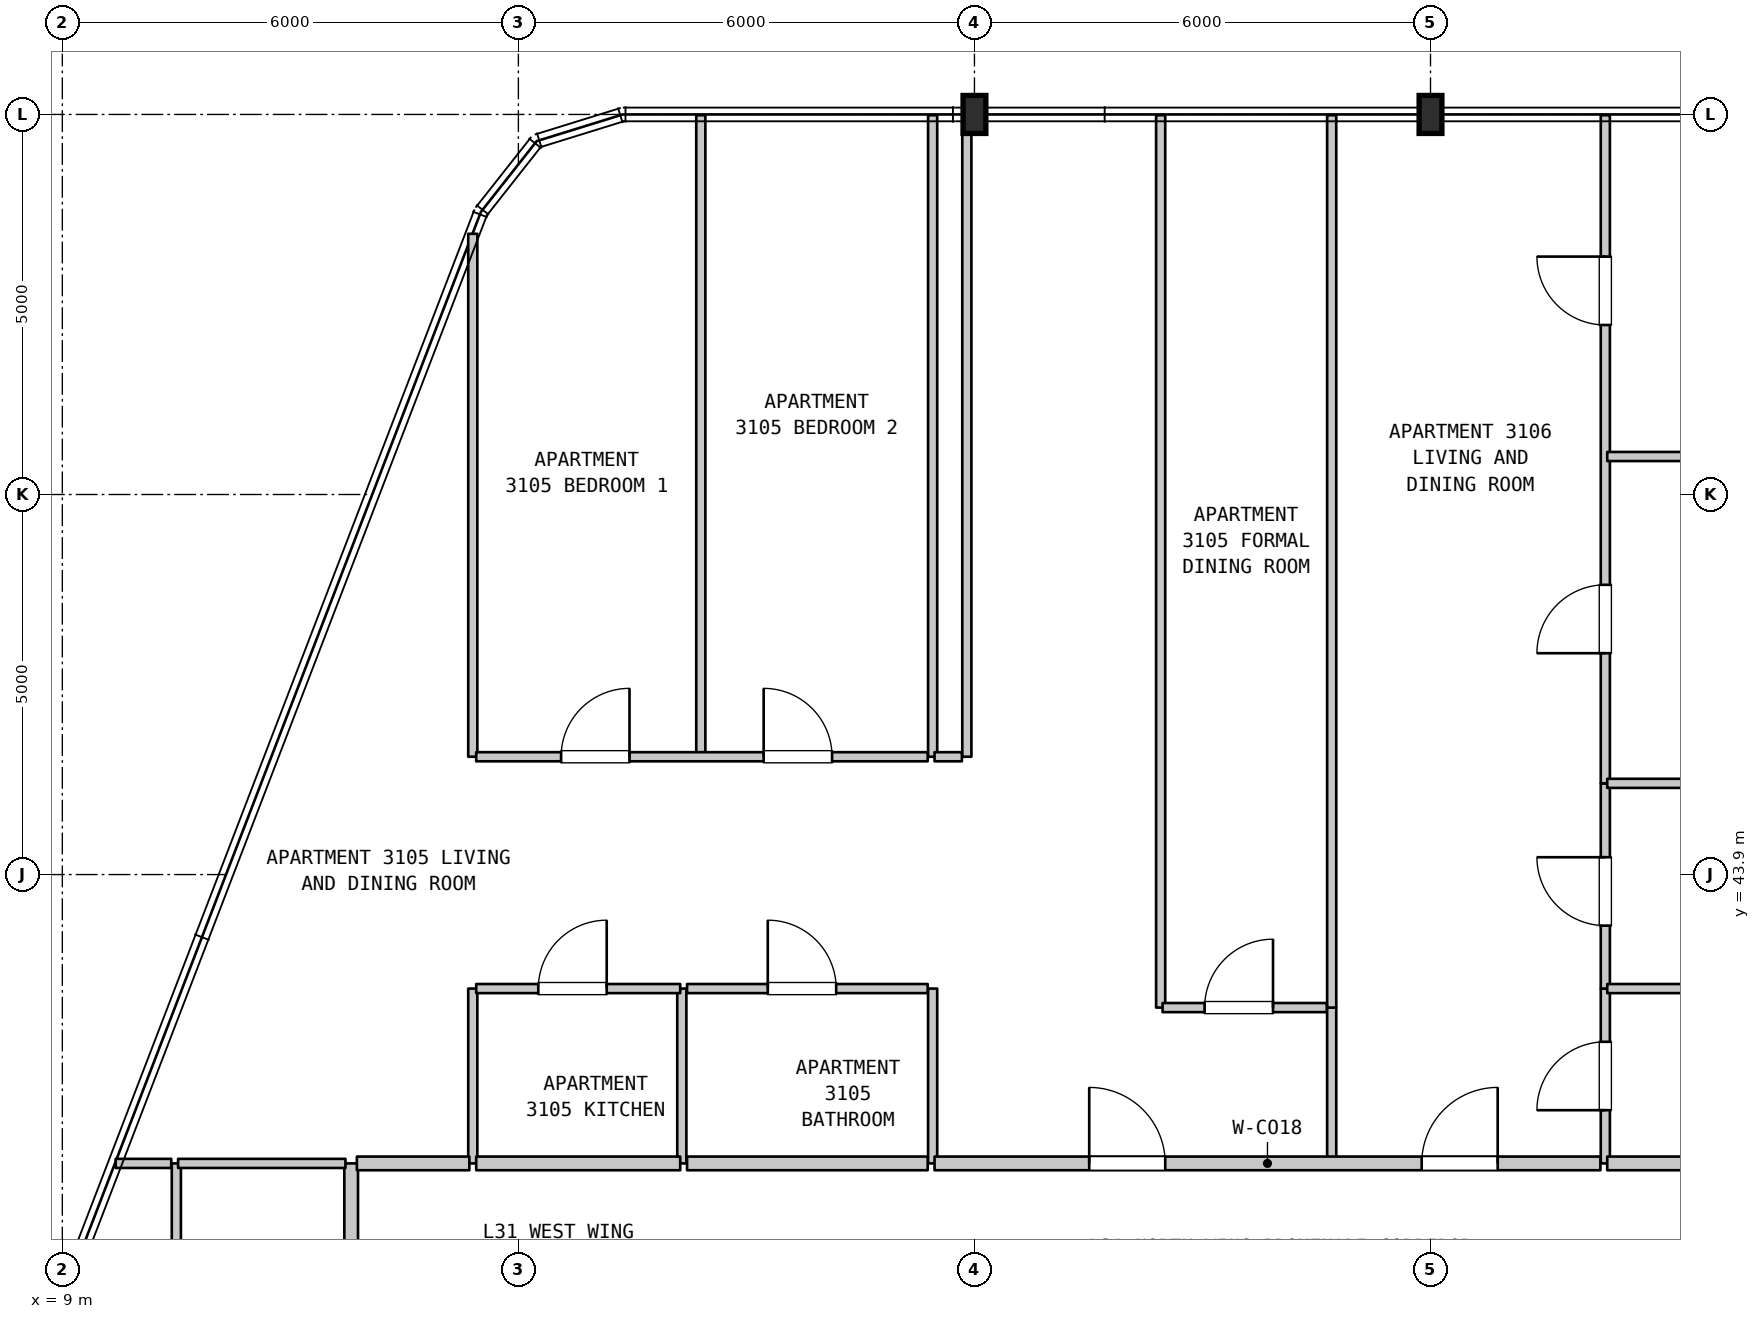
"""IFC4 building model, lengths in metres.
Left out: names, types, materials, properties, quantities, classifications, styles, units other than length and angle.
Written with IfcOpenShell. Run it as: python <this file> out.ifc"""

import sys

from ifc_helpers import new_model, si_unit, direction, frame, frame_2d, origin, origin_2d, place, context, subcontext, project, spatial, rectangle, i_section, extrude, element, fill, save


model = new_model("IFC4")
c1 = context("Model", 3, precision=1e-05, world=origin(), true_north=direction((0.0, 1.0)))
c2 = subcontext(c1, "Body", "Model", "MODEL_VIEW")
j1 = project(units=[si_unit("LENGTHUNIT", "METRE"), si_unit("PLANEANGLEUNIT", "RADIAN")], contexts=[c1])
p1 = place(None, origin())
s1 = spatial("IfcSite", under=j1, at=p1, CompositionType="ELEMENT")
p2 = place(p1, origin())
s2 = spatial("IfcBuilding", under=s1, at=p2, CompositionType="ELEMENT")
p3 = place(p2, frame((0.0, 0.0, 129.8)))
s3 = spatial("IfcBuildingStorey", under=s2, at=p3, CompositionType="ELEMENT", Elevation=129.8)
for number, where, z_axis, x_axis in (
    (1, (21.0, 53.9, 0.0), (0.0, 0.0, 1.0), (1.0, 0.0, 0.0)),
    (2, (27.0, 53.9, 0.0), (0.0, 0.0, 1.0), (1.0, 0.0, 0.0)),
):
    element("IfcColumn", number, at=place(p3, frame(where, z_axis=z_axis, x_axis=x_axis)), inside=s3, PredefinedType="COLUMN", context=c2, shape_type="SweptSolid", body=[
        extrude(i_section(OverallWidth=0.3, OverallDepth=0.5, WebThickness=0.014, FlangeThickness=0.028, FilletRadius=0.027, at=origin_2d()), origin(), (0.0, 0.0, 1.0), 3.7),
    ])
p4 = place(p3, frame((10.5, 32.36, 0.0), z_axis=(0.0, 0.0, 1.0), x_axis=(0.0, 1.0, 0.0)))
e3 = element("IfcWall", 3, at=p4, inside=s3, PredefinedType="PARTITIONING", context=c2, shape_type="SweptSolid", body=[
    extrude(rectangle(XDim=7.74, YDim=0.12, at=frame_2d((3.87, 0.0))), origin(), (0.0, 0.0, 1.0), 3.385),
])
p5 = place(p3, frame((12.8, 32.36, 0.0), z_axis=(0.0, 0.0, 1.0), x_axis=(0.0, 1.0, 0.0)))
e4 = element("IfcWall", 4, at=p5, inside=s3, PredefinedType="STANDARD", context=c2, shape_type="SweptSolid", body=[
    extrude(rectangle(XDim=7.74, YDim=0.18, at=frame_2d((3.87, 0.0))), origin(), (0.0, 0.0, 1.0), 3.385),
])
p6 = place(p3, frame((14.4, 40.1, 0.0), z_axis=(0.0, 0.0, 1.0), x_axis=(0.0, 1.0, 0.0)))
e5 = element("IfcWall", 5, at=p6, inside=s3, PredefinedType="PARTITIONING", context=c2, shape_type="SweptSolid", body=[
    extrude(rectangle(XDim=2.3, YDim=0.12, at=frame_2d((1.15, 0.0))), origin(), (0.0, 0.0, 1.0), 3.385),
])
p7 = place(p3, frame((14.4, 45.45, 0.0), z_axis=(0.0, 0.0, 1.0), x_axis=(0.0, 1.0, 0.0)))
e6 = element("IfcWall", 6, at=p7, inside=s3, PredefinedType="PARTITIONING", context=c2, shape_type="SweptSolid", body=[
    extrude(rectangle(XDim=6.88, YDim=0.12, at=frame_2d((3.44, 0.0))), origin(), (0.0, 0.0, 1.0), 3.385),
])
p8 = place(p3, frame((17.15, 40.1, 0.0), z_axis=(0.0, 0.0, 1.0), x_axis=(0.0, 1.0, 0.0)))
e7 = element("IfcWall", 7, at=p8, inside=s3, PredefinedType="PARTITIONING", context=c2, shape_type="SweptSolid", body=[
    extrude(rectangle(XDim=2.3, YDim=0.12, at=frame_2d((1.15, 0.0))), origin(), (0.0, 0.0, 1.0), 3.385),
])
p9 = place(p3, frame((17.4, 45.45, 0.0), z_axis=(0.0, 0.0, 1.0), x_axis=(0.0, 1.0, 0.0)))
e8 = element("IfcWall", 8, at=p9, inside=s3, PredefinedType="PARTITIONING", context=c2, shape_type="SweptSolid", body=[
    extrude(rectangle(XDim=8.44, YDim=0.12, at=frame_2d((4.22, 0.0))), origin(), (0.0, 0.0, 1.0), 3.385),
])
p10 = place(p3, frame((20.45, 40.1, 0.0), z_axis=(0.0, 0.0, 1.0), x_axis=(0.0, 1.0, 0.0)))
e9 = element("IfcWall", 9, at=p10, inside=s3, PredefinedType="PARTITIONING", context=c2, shape_type="SweptSolid", body=[
    extrude(rectangle(XDim=2.3, YDim=0.12, at=frame_2d((1.15, 0.0))), origin(), (0.0, 0.0, 1.0), 3.385),
])
for number, where, z_axis, x_axis in (
    (10, (20.45, 45.45, 0.0), (0.0, 0.0, 1.0), (0.0, 1.0, 0.0)),
    (11, (20.9, 45.45, 0.0), (0.0, 0.0, 1.0), (0.0, 1.0, 0.0)),
):
    element("IfcWall", number, at=place(p3, frame(where, z_axis=z_axis, x_axis=x_axis)), inside=s3, PredefinedType="PARTITIONING", context=c2, shape_type="SweptSolid", body=[
        extrude(rectangle(XDim=8.44, YDim=0.12, at=frame_2d((4.22, 0.0))), origin(), (0.0, 0.0, 1.0), 3.385),
    ])
p11 = place(p3, frame((23.45, 42.15, 0.0), z_axis=(0.0, 0.0, 1.0), x_axis=(0.0, 1.0, 0.0)))
e12 = element("IfcWall", 12, at=p11, inside=s3, PredefinedType="PARTITIONING", context=c2, shape_type="SweptSolid", body=[
    extrude(rectangle(XDim=11.74, YDim=0.12, at=frame_2d((5.87, 0.0))), origin(), (0.0, 0.0, 1.0), 3.385),
])
p12 = place(p3, frame((25.7, 40.1, 0.0), z_axis=(0.0, 0.0, 1.0), x_axis=(0.0, 1.0, 0.0)))
e13 = element("IfcWall", 13, at=p12, inside=s3, PredefinedType="PARTITIONING", context=c2, shape_type="SweptSolid", body=[
    extrude(rectangle(XDim=2.05, YDim=0.12, at=frame_2d((1.025, 0.0))), origin(), (0.0, 0.0, 1.0), 3.385),
])
p13 = place(p3, frame((25.7, 42.15, 0.0), z_axis=(0.0, 0.0, 1.0), x_axis=(0.0, 1.0, 0.0)))
e14 = element("IfcWall", 14, at=p13, inside=s3, PredefinedType="PARTITIONING", context=c2, shape_type="SweptSolid", body=[
    extrude(rectangle(XDim=11.74, YDim=0.12, at=frame_2d((5.87, 0.0))), origin(), (0.0, 0.0, 1.0), 3.385),
])
p14 = place(p3, frame((29.3, 40.1, 0.0), z_axis=(0.0, 0.0, 1.0), x_axis=(0.0, 1.0, 0.0)))
e15 = element("IfcWall", 15, at=p14, inside=s3, PredefinedType="PARTITIONING", context=c2, shape_type="SweptSolid", body=[
    extrude(rectangle(XDim=2.3, YDim=0.12, at=frame_2d((1.15, 0.0))), origin(), (0.0, 0.0, 1.0), 3.385),
])
p15 = place(p14, frame((0.7, 0.0, 0.0)))
e16 = element("IfcOpeningElement", 16, at=p15, cuts=e15, PredefinedType="OPENING", context=c2, shape_type="SweptSolid", body=[
    extrude(rectangle(XDim=0.9, YDim=2.15, at=frame_2d((0.45, 1.075))), frame((0.0, 0.07, 0.0), z_axis=(0.0, -1.0, 0.0), x_axis=(1.0, 0.0, 0.0)), (0.0, 0.0, 1.0), 0.14),
])
p16 = place(p3, frame((29.3, 42.4, 0.0), z_axis=(0.0, 0.0, 1.0), x_axis=(0.0, 1.0, 0.0)))
e17 = element("IfcWall", 17, at=p16, inside=s3, PredefinedType="PARTITIONING", context=c2, shape_type="SweptSolid", body=[
    extrude(rectangle(XDim=2.7, YDim=0.12, at=frame_2d((1.35, 0.0))), origin(), (0.0, 0.0, 1.0), 3.385),
])
p17 = place(p16, frame((0.828, 0.0, 0.0)))
e18 = element("IfcOpeningElement", 18, at=p17, cuts=e17, PredefinedType="OPENING", context=c2, shape_type="SweptSolid", body=[
    extrude(rectangle(XDim=0.9, YDim=2.1, at=frame_2d((0.45, 1.05))), frame((0.0, 0.07, 0.0), z_axis=(0.0, -1.0, 0.0), x_axis=(1.0, 0.0, 0.0)), (0.0, 0.0, 1.0), 0.14),
])
p18 = place(p3, frame((29.3, 45.1, 0.0), z_axis=(0.0, 0.0, 1.0), x_axis=(0.0, 1.0, 0.0)))
e19 = element("IfcWall", 19, at=p18, inside=s3, PredefinedType="PARTITIONING", context=c2, shape_type="SweptSolid", body=[
    extrude(rectangle(XDim=8.79, YDim=0.12, at=frame_2d((4.395, 0.0))), origin(), (0.0, 0.0, 1.0), 3.385),
])
p19 = place(p18, frame((1.712, 0.0, 0.0)))
e20 = element("IfcOpeningElement", 20, at=p19, cuts=e19, PredefinedType="OPENING", context=c2, shape_type="SweptSolid", body=[
    extrude(rectangle(XDim=0.9, YDim=2.15, at=frame_2d((0.45, 1.075))), frame((0.0, 0.07, 0.0), z_axis=(0.0, -1.0, 0.0), x_axis=(1.0, 0.0, 0.0)), (0.0, 0.0, 1.0), 0.14),
])
p20 = place(p18, frame((6.03, 0.0, 0.0)))
e21 = element("IfcOpeningElement", 21, at=p20, cuts=e19, PredefinedType="OPENING", context=c2, shape_type="SweptSolid", body=[
    extrude(rectangle(XDim=0.9, YDim=2.15, at=frame_2d((0.45, 1.075))), frame((0.0, 0.07, 0.0), z_axis=(0.0, -1.0, 0.0), x_axis=(1.0, 0.0, 0.0)), (0.0, 0.0, 1.0), 0.14),
])
p21 = place(p3, frame((9.702, 40.1, 0.0), z_axis=(0.0, 0.0, 1.0), x_axis=(1.0, 0.0, 0.0)))
e22 = element("IfcWall", 22, at=p21, inside=s3, PredefinedType="PARTITIONING", context=c2, shape_type="SweptSolid", body=[
    extrude(rectangle(XDim=0.731, YDim=0.12, at=frame_2d((0.366, 0.0))), origin(), (0.0, 0.0, 1.0), 3.385),
])
p22 = place(p3, frame((10.523, 40.1, 0.0), z_axis=(0.0, 0.0, 1.0), x_axis=(1.0, 0.0, 0.0)))
e23 = element("IfcWall", 23, at=p22, inside=s3, PredefinedType="PARTITIONING", context=c2, shape_type="SweptSolid", body=[
    extrude(rectangle(XDim=2.202, YDim=0.12, at=frame_2d((1.101, 0.0))), origin(), (0.0, 0.0, 1.0), 3.385),
])
p23 = place(p3, frame((12.875, 40.1, 0.0), z_axis=(0.0, 0.0, 1.0), x_axis=(1.0, 0.0, 0.0)))
e24 = element("IfcWall", 24, at=p23, inside=s3, PredefinedType="STANDARD", context=c2, shape_type="SweptSolid", body=[
    extrude(rectangle(XDim=1.48, YDim=0.18, at=frame_2d((0.74, 0.0))), origin(), (0.0, 0.0, 1.0), 3.385),
])
p24 = place(p3, frame((14.445, 40.1, 0.0), z_axis=(0.0, 0.0, 1.0), x_axis=(1.0, 0.0, 0.0)))
e25 = element("IfcWall", 25, at=p24, inside=s3, PredefinedType="STANDARD", context=c2, shape_type="SweptSolid", body=[
    extrude(rectangle(XDim=2.684, YDim=0.18, at=frame_2d((1.342, 0.0))), origin(), (0.0, 0.0, 1.0), 3.385),
])
p25 = place(p3, frame((17.219, 40.1, 0.0), z_axis=(0.0, 0.0, 1.0), x_axis=(1.0, 0.0, 0.0)))
e26 = element("IfcWall", 26, at=p25, inside=s3, PredefinedType="STANDARD", context=c2, shape_type="SweptSolid", body=[
    extrude(rectangle(XDim=3.166, YDim=0.18, at=frame_2d((1.583, 0.0))), origin(), (0.0, 0.0, 1.0), 3.385),
])
p26 = place(p3, frame((20.475, 40.1, 0.0), z_axis=(0.0, 0.0, 1.0), x_axis=(1.0, 0.0, 0.0)))
e27 = element("IfcWall", 27, at=p26, inside=s3, PredefinedType="STANDARD", context=c2, shape_type="SweptSolid", body=[
    extrude(rectangle(XDim=8.76, YDim=0.18, at=frame_2d((4.38, 0.0))), origin(), (0.0, 0.0, 1.0), 3.385),
])
p27 = place(p26, frame((2.035, 0.0, 0.0)))
e28 = element("IfcOpeningElement", 28, at=p27, cuts=e27, PredefinedType="OPENING", context=c2, shape_type="SweptSolid", body=[
    extrude(rectangle(XDim=1.0, YDim=2.15, at=frame_2d((0.5, 1.075))), frame((0.0, 0.1, 0.0), z_axis=(0.0, -1.0, 0.0), x_axis=(1.0, 0.0, 0.0)), (0.0, 0.0, 1.0), 0.2),
])
p28 = place(p26, frame((6.409, 0.0, 0.0)))
e29 = element("IfcOpeningElement", 29, at=p28, cuts=e27, PredefinedType="OPENING", context=c2, shape_type="SweptSolid", body=[
    extrude(rectangle(XDim=1.0, YDim=2.15, at=frame_2d((0.5, 1.075))), frame((0.0, 0.1, 0.0), z_axis=(0.0, -1.0, 0.0), x_axis=(1.0, 0.0, 0.0)), (0.0, 0.0, 1.0), 0.2),
])
p29 = place(p3, frame((29.325, 40.1, 0.0), z_axis=(0.0, 0.0, 1.0), x_axis=(1.0, 0.0, 0.0)))
e30 = element("IfcWall", 30, at=p29, inside=s3, PredefinedType="STANDARD", context=c2, shape_type="SweptSolid", body=[
    extrude(rectangle(XDim=6.02, YDim=0.18, at=frame_2d((3.01, 0.0))), origin(), (0.0, 0.0, 1.0), 3.385),
])
p30 = place(p3, frame((23.475, 42.15, 0.0), z_axis=(0.0, 0.0, 1.0), x_axis=(1.0, 0.0, 0.0)))
e31 = element("IfcWall", 31, at=p30, inside=s3, PredefinedType="PARTITIONING", context=c2, shape_type="SweptSolid", body=[
    extrude(rectangle(XDim=2.16, YDim=0.12, at=frame_2d((1.08, 0.0))), origin(), (0.0, 0.0, 1.0), 3.385),
])
p31 = place(p30, frame((0.553, 0.0, 0.0)))
e32 = element("IfcOpeningElement", 32, at=p31, cuts=e31, PredefinedType="OPENING", context=c2, shape_type="SweptSolid", body=[
    extrude(rectangle(XDim=0.9, YDim=2.15, at=frame_2d((0.45, 1.075))), frame((0.0, 0.07, 0.0), z_axis=(0.0, -1.0, 0.0), x_axis=(1.0, 0.0, 0.0)), (0.0, 0.0, 1.0), 0.14),
])
p32 = place(p3, frame((14.445, 42.4, 0.0), z_axis=(0.0, 0.0, 1.0), x_axis=(1.0, 0.0, 0.0)))
e33 = element("IfcWall", 33, at=p32, inside=s3, PredefinedType="PARTITIONING", context=c2, shape_type="SweptSolid", body=[
    extrude(rectangle(XDim=2.684, YDim=0.12, at=frame_2d((1.342, 0.0))), origin(), (0.0, 0.0, 1.0), 3.385),
])
p33 = place(p32, frame((0.817, 0.0, 0.0)))
e34 = element("IfcOpeningElement", 34, at=p33, cuts=e33, PredefinedType="OPENING", context=c2, shape_type="SweptSolid", body=[
    extrude(rectangle(XDim=0.9, YDim=2.15, at=frame_2d((0.45, 1.075))), frame((0.0, 0.07, 0.0), z_axis=(0.0, -1.0, 0.0), x_axis=(1.0, 0.0, 0.0)), (0.0, 0.0, 1.0), 0.14),
])
p34 = place(p3, frame((17.219, 42.4, 0.0), z_axis=(0.0, 0.0, 1.0), x_axis=(1.0, 0.0, 0.0)))
e35 = element("IfcWall", 35, at=p34, inside=s3, PredefinedType="PARTITIONING", context=c2, shape_type="SweptSolid", body=[
    extrude(rectangle(XDim=3.166, YDim=0.12, at=frame_2d((1.583, 0.0))), origin(), (0.0, 0.0, 1.0), 3.385),
])
p35 = place(p34, frame((1.062, 0.0, 0.0)))
e36 = element("IfcOpeningElement", 36, at=p35, cuts=e35, PredefinedType="OPENING", context=c2, shape_type="SweptSolid", body=[
    extrude(rectangle(XDim=0.9, YDim=2.1, at=frame_2d((0.45, 1.05))), frame((0.0, 0.07, 0.0), z_axis=(0.0, -1.0, 0.0), x_axis=(1.0, 0.0, 0.0)), (0.0, 0.0, 1.0), 0.14),
])
for number, where, z_axis, x_axis in (
    (37, (29.325, 42.4, 0.0), (0.0, 0.0, 1.0), (1.0, 0.0, 0.0)),
    (38, (29.325, 45.1, 0.0), (0.0, 0.0, 1.0), (1.0, 0.0, 0.0)),
):
    element("IfcWall", number, at=place(p3, frame(where, z_axis=z_axis, x_axis=x_axis)), inside=s3, PredefinedType="PARTITIONING", context=c2, shape_type="SweptSolid", body=[
        extrude(rectangle(XDim=6.02, YDim=0.12, at=frame_2d((3.01, 0.0))), origin(), (0.0, 0.0, 1.0), 3.385),
    ])
p36 = place(p3, frame((14.445, 45.45, 0.0), z_axis=(0.0, 0.0, 1.0), x_axis=(1.0, 0.0, 0.0)))
e39 = element("IfcWall", 39, at=p36, inside=s3, PredefinedType="PARTITIONING", context=c2, shape_type="SweptSolid", body=[
    extrude(rectangle(XDim=5.94, YDim=0.12, at=frame_2d((2.97, 0.0))), origin(), (0.0, 0.0, 1.0), 3.385),
])
p37 = place(p36, frame((1.117, 0.0, 0.0)))
e40 = element("IfcOpeningElement", 40, at=p37, cuts=e39, PredefinedType="OPENING", context=c2, shape_type="SweptSolid", body=[
    extrude(rectangle(XDim=0.9, YDim=2.15, at=frame_2d((0.45, 1.075))), frame((0.0, 0.07, 0.0), z_axis=(0.0, -1.0, 0.0), x_axis=(1.0, 0.0, 0.0)), (0.0, 0.0, 1.0), 0.14),
])
p38 = place(p36, frame((3.782, 0.0, 0.0)))
e41 = element("IfcOpeningElement", 41, at=p38, cuts=e39, PredefinedType="OPENING", context=c2, shape_type="SweptSolid", body=[
    extrude(rectangle(XDim=0.9, YDim=2.15, at=frame_2d((0.45, 1.075))), frame((0.0, 0.07, 0.0), z_axis=(0.0, -1.0, 0.0), x_axis=(1.0, 0.0, 0.0)), (0.0, 0.0, 1.0), 0.14),
])
p39 = place(p3, frame((20.475, 45.45, 0.0), z_axis=(0.0, 0.0, 1.0), x_axis=(1.0, 0.0, 0.0)))
e42 = element("IfcWall", 42, at=p39, inside=s3, PredefinedType="PARTITIONING", context=c2, shape_type="SweptSolid", body=[
    extrude(rectangle(XDim=0.36, YDim=0.12, at=frame_2d((0.18, 0.0))), origin(), (0.0, 0.0, 1.0), 3.385),
])
p40 = place(p3, frame((29.325, 49.4, 0.0), z_axis=(0.0, 0.0, 1.0), x_axis=(1.0, 0.0, 0.0)))
e43 = element("IfcWall", 43, at=p40, inside=s3, PredefinedType="PARTITIONING", context=c2, shape_type="SweptSolid", body=[
    extrude(rectangle(XDim=6.02, YDim=0.12, at=frame_2d((3.01, 0.0))), origin(), (0.0, 0.0, 1.0), 3.385),
])
p41 = place(p15, origin())
e44 = element("IfcDoor", 44, at=p41, inside=s3, OperationType="SINGLE_SWING_LEFT", PredefinedType="DOOR", context=c2, shape_type="SweptSolid", body=[
    extrude(rectangle(XDim=0.9, YDim=2.15, at=frame_2d((0.45, 1.075))), frame((0.0, 0.025, 0.0), z_axis=(0.0, -1.0, 0.0), x_axis=(1.0, 0.0, 0.0)), (0.0, 0.0, 1.0), 0.05),
])
fill(e16, e44)
p42 = place(p17, origin())
e45 = element("IfcDoor", 45, at=p42, inside=s3, OperationType="SINGLE_SWING_RIGHT", PredefinedType="DOOR", context=c2, shape_type="SweptSolid", body=[
    extrude(rectangle(XDim=0.9, YDim=2.1, at=frame_2d((0.45, 1.05))), frame((0.0, 0.025, 0.0), z_axis=(0.0, -1.0, 0.0), x_axis=(1.0, 0.0, 0.0)), (0.0, 0.0, 1.0), 0.05),
])
fill(e18, e45)
p43 = place(p19, origin())
e46 = element("IfcDoor", 46, at=p43, inside=s3, OperationType="SINGLE_SWING_LEFT", PredefinedType="DOOR", context=c2, shape_type="SweptSolid", body=[
    extrude(rectangle(XDim=0.9, YDim=2.15, at=frame_2d((0.45, 1.075))), frame((0.0, 0.025, 0.0), z_axis=(0.0, -1.0, 0.0), x_axis=(1.0, 0.0, 0.0)), (0.0, 0.0, 1.0), 0.05),
])
fill(e20, e46)
p44 = place(p20, origin())
e47 = element("IfcDoor", 47, at=p44, inside=s3, OperationType="SINGLE_SWING_RIGHT", PredefinedType="DOOR", context=c2, shape_type="SweptSolid", body=[
    extrude(rectangle(XDim=0.9, YDim=2.15, at=frame_2d((0.45, 1.075))), frame((0.0, 0.025, 0.0), z_axis=(0.0, -1.0, 0.0), x_axis=(1.0, 0.0, 0.0)), (0.0, 0.0, 1.0), 0.05),
])
fill(e21, e47)
p45 = place(p27, origin())
e48 = element("IfcDoor", 48, at=p45, inside=s3, OperationType="SINGLE_SWING_LEFT", PredefinedType="DOOR", context=c2, shape_type="SweptSolid", body=[
    extrude(rectangle(XDim=1.0, YDim=2.15, at=frame_2d((0.5, 1.075))), frame((0.0, 0.025, 0.0), z_axis=(0.0, -1.0, 0.0), x_axis=(1.0, 0.0, 0.0)), (0.0, 0.0, 1.0), 0.05),
])
fill(e28, e48)
p46 = place(p28, origin())
e49 = element("IfcDoor", 49, at=p46, inside=s3, OperationType="SINGLE_SWING_RIGHT", PredefinedType="DOOR", context=c2, shape_type="SweptSolid", body=[
    extrude(rectangle(XDim=1.0, YDim=2.15, at=frame_2d((0.5, 1.075))), frame((0.0, 0.025, 0.0), z_axis=(0.0, -1.0, 0.0), x_axis=(1.0, 0.0, 0.0)), (0.0, 0.0, 1.0), 0.05),
])
fill(e29, e49)
p47 = place(p31, origin())
e50 = element("IfcDoor", 50, at=p47, inside=s3, OperationType="SINGLE_SWING_RIGHT", PredefinedType="DOOR", context=c2, shape_type="SweptSolid", body=[
    extrude(rectangle(XDim=0.9, YDim=2.15, at=frame_2d((0.45, 1.075))), frame((0.0, 0.025, 0.0), z_axis=(0.0, -1.0, 0.0), x_axis=(1.0, 0.0, 0.0)), (0.0, 0.0, 1.0), 0.05),
])
fill(e32, e50)
p48 = place(p33, origin())
e51 = element("IfcDoor", 51, at=p48, inside=s3, OperationType="SINGLE_SWING_RIGHT", PredefinedType="DOOR", context=c2, shape_type="SweptSolid", body=[
    extrude(rectangle(XDim=0.9, YDim=2.15, at=frame_2d((0.45, 1.075))), frame((0.0, 0.025, 0.0), z_axis=(0.0, -1.0, 0.0), x_axis=(1.0, 0.0, 0.0)), (0.0, 0.0, 1.0), 0.05),
])
fill(e34, e51)
p49 = place(p35, origin())
e52 = element("IfcDoor", 52, at=p49, inside=s3, OperationType="SINGLE_SWING_LEFT", PredefinedType="DOOR", context=c2, shape_type="SweptSolid", body=[
    extrude(rectangle(XDim=0.9, YDim=2.1, at=frame_2d((0.45, 1.05))), frame((0.0, 0.025, 0.0), z_axis=(0.0, -1.0, 0.0), x_axis=(1.0, 0.0, 0.0)), (0.0, 0.0, 1.0), 0.05),
])
fill(e36, e52)
p50 = place(p37, origin())
e53 = element("IfcDoor", 53, at=p50, inside=s3, OperationType="SINGLE_SWING_RIGHT", PredefinedType="DOOR", context=c2, shape_type="SweptSolid", body=[
    extrude(rectangle(XDim=0.9, YDim=2.15, at=frame_2d((0.45, 1.075))), frame((0.0, 0.025, 0.0), z_axis=(0.0, -1.0, 0.0), x_axis=(1.0, 0.0, 0.0)), (0.0, 0.0, 1.0), 0.05),
])
fill(e40, e53)
p51 = place(p38, origin())
e54 = element("IfcDoor", 54, at=p51, inside=s3, OperationType="SINGLE_SWING_LEFT", PredefinedType="DOOR", context=c2, shape_type="SweptSolid", body=[
    extrude(rectangle(XDim=0.9, YDim=2.15, at=frame_2d((0.45, 1.075))), frame((0.0, 0.025, 0.0), z_axis=(0.0, -1.0, 0.0), x_axis=(1.0, 0.0, 0.0)), (0.0, 0.0, 1.0), 0.05),
])
fill(e41, e54)
save(model, sys.argv[1])
